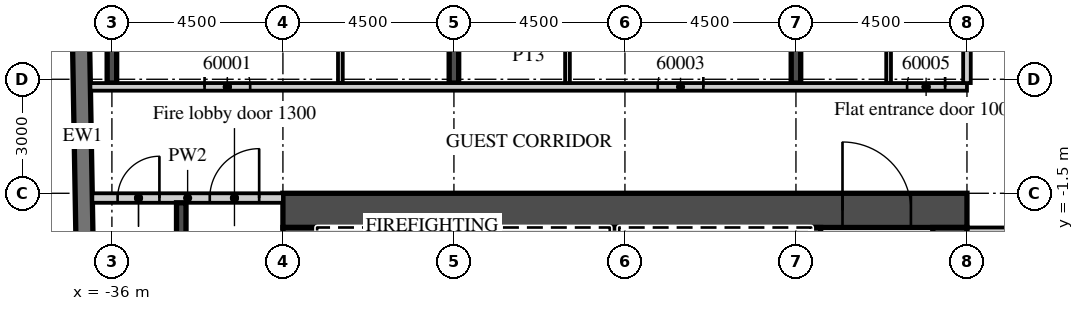
"""IFC4 building model, lengths in metres.
Left out: names, types, materials, properties, quantities, classifications, styles, units other than length and angle.
Written with IfcOpenShell. Run it as: python <this file> out.ifc"""

import sys

from ifc_helpers import new_model, si_unit, direction, frame, frame_2d, origin, place, context, subcontext, project, spatial, rectangle, extrude, element, fill, save


model = new_model("IFC4")
c1 = context("Model", 3, precision=1e-05, world=origin(), true_north=direction((0.0, 1.0)))
c2 = subcontext(c1, "Body", "Model", "MODEL_VIEW")
j1 = project(units=[si_unit("LENGTHUNIT", "METRE"), si_unit("PLANEANGLEUNIT", "RADIAN")], contexts=[c1])
p1 = place(None, origin())
s1 = spatial("IfcSite", under=j1, at=p1, CompositionType="ELEMENT")
p2 = place(p1, origin())
s2 = spatial("IfcBuilding", under=s1, at=p2, CompositionType="ELEMENT")
p3 = place(p2, frame((0.0, 0.0, 244.1)))
s3 = spatial("IfcBuildingStorey", under=s2, at=p3, CompositionType="ELEMENT", Elevation=244.1)
p4 = place(p3, frame((-36.0, 1.4, 0.0), z_axis=(0.0, 0.0, 1.0), x_axis=(0.0, 1.0, 0.0)))
e1 = element("IfcWall", 1, at=p4, inside=s3, PredefinedType="SHEAR", context=c2, shape_type="SweptSolid", body=[
    extrude(rectangle(XDim=17.125, YDim=0.25, at=frame_2d((8.563, 0.0))), origin(), (0.0, 0.0, 1.0), 3.3),
])
p5 = place(p3, frame((-27.0, 1.4, 0.0), z_axis=(0.0, 0.0, 1.0), x_axis=(0.0, 1.0, 0.0)))
e2 = element("IfcWall", 2, at=p5, inside=s3, PredefinedType="SHEAR", context=c2, shape_type="SweptSolid", body=[
    extrude(rectangle(XDim=18.817, YDim=0.25, at=frame_2d((9.409, 0.0))), origin(), (0.0, 0.0, 1.0), 3.3),
])
p6 = place(p3, frame((-18.0, 1.4, 0.0), z_axis=(0.0, 0.0, 1.0), x_axis=(0.0, 1.0, 0.0)))
e3 = element("IfcWall", 3, at=p6, inside=s3, PredefinedType="SHEAR", context=c2, shape_type="SweptSolid", body=[
    extrude(rectangle(XDim=18.974, YDim=0.25, at=frame_2d((9.487, 0.0))), origin(), (0.0, 0.0, 1.0), 3.3),
])
p7 = place(p3, frame((-37.057, 16.503, 0.0), z_axis=(0.0, 0.0, 1.0), x_axis=(0.017452279857, -0.999847697366, 0.0)))
e4 = element("IfcWall", 4, at=p7, inside=s3, PredefinedType="SOLIDWALL", context=c2, shape_type="SweptSolid", body=[
    extrude(rectangle(XDim=33.0, YDim=0.45, at=frame_2d((16.5, 0.0))), origin(), (0.0, 0.0, 1.0), 3.02),
])
p8 = place(p3, frame((-36.566, 1.3, 0.0), z_axis=(0.0, 0.0, 1.0), x_axis=(1.0, 0.0, 0.0)))
e5 = element("IfcWall", 5, at=p8, inside=s3, PredefinedType="PARTITIONING", context=c2, shape_type="SweptSolid", body=[
    extrude(rectangle(XDim=23.066, YDim=0.2, at=frame_2d((11.533, 0.0))), origin(), (0.0, 0.0, 1.0), 3.02),
])
p9 = place(p8, frame((3.004, 0.0, 0.0)))
e6 = element("IfcOpeningElement", 6, at=p9, cuts=e5, PredefinedType="OPENING", context=c2, shape_type="SweptSolid", body=[
    extrude(rectangle(XDim=1.2, YDim=2.1, at=frame_2d((0.6, 1.05))), frame((0.0, 0.11, 0.0), z_axis=(0.0, -1.0, 0.0), x_axis=(1.0, 0.0, 0.0)), (0.0, 0.0, 1.0), 0.22),
])
p10 = place(p8, frame((14.929, 0.0, 0.0)))
e7 = element("IfcOpeningElement", 7, at=p10, cuts=e5, PredefinedType="OPENING", context=c2, shape_type="SweptSolid", body=[
    extrude(rectangle(XDim=1.2, YDim=2.1, at=frame_2d((0.6, 1.05))), frame((0.0, 0.11, 0.0), z_axis=(0.0, -1.0, 0.0), x_axis=(1.0, 0.0, 0.0)), (0.0, 0.0, 1.0), 0.22),
])
p11 = place(p8, frame((21.491, 0.0, 0.0)))
e8 = element("IfcOpeningElement", 8, at=p11, cuts=e5, PredefinedType="OPENING", context=c2, shape_type="SweptSolid", body=[
    extrude(rectangle(XDim=1.0, YDim=2.1, at=frame_2d((0.5, 1.05))), frame((0.0, 0.11, 0.0), z_axis=(0.0, -1.0, 0.0), x_axis=(1.0, 0.0, 0.0)), (0.0, 0.0, 1.0), 0.22),
])
p12 = place(p3, frame((-29.988, 1.4, 0.0), z_axis=(0.0, 0.0, 1.0), x_axis=(0.0, 1.0, 0.0)))
e9 = element("IfcWall", 9, at=p12, inside=s3, PredefinedType="PARTITIONING", context=c2, shape_type="SweptSolid", body=[
    extrude(rectangle(XDim=7.725, YDim=0.125, at=frame_2d((3.863, 0.0))), origin(), (0.0, 0.0, 1.0), 3.02),
])
p13 = place(p12, frame((2.45, 0.0, 0.0)))
e10 = element("IfcOpeningElement", 10, at=p13, cuts=e9, PredefinedType="OPENING", context=c2, shape_type="SweptSolid", body=[
    extrude(rectangle(XDim=0.9, YDim=2.1, at=frame_2d((0.45, 1.05))), frame((0.0, 0.073, 0.0), z_axis=(0.0, -1.0, 0.0), x_axis=(1.0, 0.0, 0.0)), (0.0, 0.0, 1.0), 0.145),
])
p14 = place(p3, frame((-24.012, 1.4, 0.0), z_axis=(0.0, 0.0, 1.0), x_axis=(0.0, 1.0, 0.0)))
e11 = element("IfcWall", 11, at=p14, inside=s3, PredefinedType="PARTITIONING", context=c2, shape_type="SweptSolid", body=[
    extrude(rectangle(XDim=7.725, YDim=0.125, at=frame_2d((3.863, 0.0))), origin(), (0.0, 0.0, 1.0), 3.02),
])
p15 = place(p14, frame((2.45, 0.0, 0.0)))
e12 = element("IfcOpeningElement", 12, at=p15, cuts=e11, PredefinedType="OPENING", context=c2, shape_type="SweptSolid", body=[
    extrude(rectangle(XDim=0.9, YDim=2.1, at=frame_2d((0.45, 1.05))), frame((0.0, 0.073, 0.0), z_axis=(0.0, -1.0, 0.0), x_axis=(1.0, 0.0, 0.0)), (0.0, 0.0, 1.0), 0.145),
])
p16 = place(p3, frame((-13.5, 1.4, 0.0), z_axis=(0.0, 0.0, 1.0), x_axis=(0.0, 1.0, 0.0)))
e13 = element("IfcWall", 13, at=p16, inside=s3, PredefinedType="PARTITIONING", context=c2, shape_type="SweptSolid", body=[
    extrude(rectangle(XDim=19.065, YDim=0.2, at=frame_2d((9.533, 0.0))), origin(), (0.0, 0.0, 1.0), 3.02),
])
p17 = place(p3, frame((-15.562, 1.4, 0.0), z_axis=(0.0, 0.0, 1.0), x_axis=(0.0, 1.0, 0.0)))
e14 = element("IfcWall", 14, at=p17, inside=s3, PredefinedType="PARTITIONING", context=c2, shape_type="SweptSolid", body=[
    extrude(rectangle(XDim=7.725, YDim=0.125, at=frame_2d((3.863, 0.0))), origin(), (0.0, 0.0, 1.0), 3.02),
])
p18 = place(p17, frame((2.45, 0.0, 0.0)))
e15 = element("IfcOpeningElement", 15, at=p18, cuts=e14, PredefinedType="OPENING", context=c2, shape_type="SweptSolid", body=[
    extrude(rectangle(XDim=0.9, YDim=2.1, at=frame_2d((0.45, 1.05))), frame((0.0, 0.073, 0.0), z_axis=(0.0, -1.0, 0.0), x_axis=(1.0, 0.0, 0.0)), (0.0, 0.0, 1.0), 0.145),
])
p19 = place(p3, frame((-13.5, -2.5, 0.0), z_axis=(0.0, 0.0, 1.0), x_axis=(1.0, 0.0, 0.0)))
e16 = element("IfcWall", 16, at=p19, inside=s3, PredefinedType="PARTITIONING", context=c2, shape_type="SweptSolid", body=[
    extrude(rectangle(XDim=27.0, YDim=0.2, at=frame_2d((13.5, 0.0))), origin(), (0.0, 0.0, 1.0), 3.02),
])
p20 = place(p19, frame((2.925, 0.0, 0.0)))
e17 = element("IfcOpeningElement", 17, at=p20, cuts=e16, PredefinedType="OPENING", context=c2, shape_type="SweptSolid", body=[
    extrude(rectangle(XDim=1.0, YDim=2.1, at=frame_2d((0.5, 1.05))), frame((0.0, 0.11, 0.0), z_axis=(0.0, -1.0, 0.0), x_axis=(1.0, 0.0, 0.0)), (0.0, 0.0, 1.0), 0.22),
])
p21 = place(p19, frame((5.075, 0.0, 0.0)))
e18 = element("IfcOpeningElement", 18, at=p21, cuts=e16, PredefinedType="OPENING", context=c2, shape_type="SweptSolid", body=[
    extrude(rectangle(XDim=1.0, YDim=2.1, at=frame_2d((0.5, 1.05))), frame((0.0, 0.11, 0.0), z_axis=(0.0, -1.0, 0.0), x_axis=(1.0, 0.0, 0.0)), (0.0, 0.0, 1.0), 0.22),
])
p22 = place(p19, frame((9.55, 0.0, 0.0)))
e19 = element("IfcOpeningElement", 19, at=p22, cuts=e16, PredefinedType="OPENING", context=c2, shape_type="SweptSolid", body=[
    extrude(rectangle(XDim=1.0, YDim=2.1, at=frame_2d((0.5, 1.05))), frame((0.0, 0.11, 0.0), z_axis=(0.0, -1.0, 0.0), x_axis=(1.0, 0.0, 0.0)), (0.0, 0.0, 1.0), 0.22),
])
p23 = place(p19, frame((14.075, 0.0, 0.0)))
e20 = element("IfcOpeningElement", 20, at=p23, cuts=e16, PredefinedType="OPENING", context=c2, shape_type="SweptSolid", body=[
    extrude(rectangle(XDim=1.0, YDim=2.1, at=frame_2d((0.5, 1.05))), frame((0.0, 0.11, 0.0), z_axis=(0.0, -1.0, 0.0), x_axis=(1.0, 0.0, 0.0)), (0.0, 0.0, 1.0), 0.22),
])
p24 = place(p19, frame((20.925, 0.0, 0.0)))
e21 = element("IfcOpeningElement", 21, at=p24, cuts=e16, PredefinedType="OPENING", context=c2, shape_type="SweptSolid", body=[
    extrude(rectangle(XDim=1.0, YDim=2.1, at=frame_2d((0.5, 1.05))), frame((0.0, 0.11, 0.0), z_axis=(0.0, -1.0, 0.0), x_axis=(1.0, 0.0, 0.0)), (0.0, 0.0, 1.0), 0.22),
])
p25 = place(p19, frame((23.075, 0.0, 0.0)))
e22 = element("IfcOpeningElement", 22, at=p25, cuts=e16, PredefinedType="OPENING", context=c2, shape_type="SweptSolid", body=[
    extrude(rectangle(XDim=1.0, YDim=2.1, at=frame_2d((0.5, 1.05))), frame((0.0, 0.11, 0.0), z_axis=(0.0, -1.0, 0.0), x_axis=(1.0, 0.0, 0.0)), (0.0, 0.0, 1.0), 0.22),
])
p26 = place(p3, frame((-31.5, -1.95, 0.0), z_axis=(0.0, 0.0, 1.0), x_axis=(1.0, 0.0, 0.0)))
e23 = element("IfcWall", 23, at=p26, inside=s3, PredefinedType="SHEAR", context=c2, shape_type="SweptSolid", body=[
    extrude(rectangle(XDim=18.0, YDim=0.9, at=frame_2d((9.0, 0.0))), origin(), (0.0, 0.0, 1.0), 3.02),
])
p27 = place(p26, frame((14.725, 0.0, 0.0)))
e24 = element("IfcOpeningElement", 24, at=p27, cuts=e23, PredefinedType="OPENING", context=c2, shape_type="SweptSolid", body=[
    extrude(rectangle(XDim=1.8, YDim=2.1, at=frame_2d((0.9, 1.05))), frame((0.0, 0.46, 0.0), z_axis=(0.0, -1.0, 0.0), x_axis=(1.0, 0.0, 0.0)), (0.0, 0.0, 1.0), 0.92),
])
p28 = place(p3, frame((-31.05, -15.2, 0.0), z_axis=(0.0, 0.0, 1.0), x_axis=(0.0, 1.0, 0.0)))
e25 = element("IfcWall", 25, at=p28, inside=s3, PredefinedType="SHEAR", context=c2, shape_type="SweptSolid", body=[
    extrude(rectangle(XDim=12.8, YDim=0.9, at=frame_2d((6.4, 0.0))), origin(), (0.0, 0.0, 1.0), 3.02),
])
p29 = place(p28, frame((11.5, 0.0, 0.0)))
e26 = element("IfcOpeningElement", 26, at=p29, cuts=e25, PredefinedType="OPENING", context=c2, shape_type="SweptSolid", body=[
    extrude(rectangle(XDim=1.1, YDim=2.1, at=frame_2d((0.55, 1.05))), frame((0.0, 0.46, 0.0), z_axis=(0.0, -1.0, 0.0), x_axis=(1.0, 0.0, 0.0)), (0.0, 0.0, 1.0), 0.92),
])
p30 = place(p3, frame((-13.95, -14.6, 0.0), z_axis=(0.0, 0.0, 1.0), x_axis=(0.0, 1.0, 0.0)))
e27 = element("IfcWall", 27, at=p30, inside=s3, PredefinedType="SHEAR", context=c2, shape_type="SweptSolid", body=[
    extrude(rectangle(XDim=12.2, YDim=0.9, at=frame_2d((6.1, 0.0))), origin(), (0.0, 0.0, 1.0), 3.02),
])
p31 = place(p3, frame((-17.475, -5.55, 0.0), z_axis=(0.0, 0.0, 1.0), x_axis=(0.0, 1.0, 0.0)))
e28 = element("IfcWall", 28, at=p31, inside=s3, PredefinedType="SHEAR", context=c2, shape_type="SweptSolid", body=[
    extrude(rectangle(XDim=3.15, YDim=0.25, at=frame_2d((1.575, 0.0))), origin(), (0.0, 0.0, 1.0), 3.02),
])
for number, where, z_axis, x_axis in (
    (29, (-27.975, -5.3, 0.0), (0.0, 0.0, 1.0), (0.0, 1.0, 0.0)),
    (30, (-22.775, -5.3, 0.0), (0.0, 0.0, 1.0), (0.0, 1.0, 0.0)),
):
    element("IfcWall", number, at=place(p3, frame(where, z_axis=z_axis, x_axis=x_axis)), inside=s3, PredefinedType="SHEAR", context=c2, shape_type="SweptSolid", body=[
        extrude(rectangle(XDim=2.9, YDim=0.25, at=frame_2d((1.45, 0.0))), origin(), (0.0, 0.0, 1.0), 3.02),
    ])
p32 = place(p3, frame((-36.515, -1.625, 0.0), z_axis=(0.0, 0.0, 1.0), x_axis=(1.0, 0.0, 0.0)))
e31 = element("IfcWall", 31, at=p32, inside=s3, PredefinedType="PARTITIONING", context=c2, shape_type="SweptSolid", body=[
    extrude(rectangle(XDim=5.015, YDim=0.25, at=frame_2d((2.508, 0.0))), origin(), (0.0, 0.0, 1.0), 3.02),
])
p33 = place(p32, frame((3.09, 0.0, 0.0)))
e32 = element("IfcOpeningElement", 32, at=p33, cuts=e31, PredefinedType="OPENING", context=c2, shape_type="SweptSolid", body=[
    extrude(rectangle(XDim=1.3, YDim=2.1, at=frame_2d((0.65, 1.05))), frame((0.0, 0.135, 0.0), z_axis=(0.0, -1.0, 0.0), x_axis=(1.0, 0.0, 0.0)), (0.0, 0.0, 1.0), 0.27),
])
p34 = place(p32, frame((0.665, 0.0, 0.0)))
e33 = element("IfcOpeningElement", 33, at=p34, cuts=e31, PredefinedType="OPENING", context=c2, shape_type="SweptSolid", body=[
    extrude(rectangle(XDim=1.1, YDim=2.1, at=frame_2d((0.55, 1.05))), frame((0.0, 0.135, 0.0), z_axis=(0.0, -1.0, 0.0), x_axis=(1.0, 0.0, 0.0)), (0.0, 0.0, 1.0), 0.27),
])
p35 = place(p3, frame((-34.175, -10.1, 0.0), z_axis=(0.0, 0.0, 1.0), x_axis=(0.0, 1.0, 0.0)))
e34 = element("IfcWall", 34, at=p35, inside=s3, PredefinedType="SHEAR", context=c2, shape_type="SweptSolid", body=[
    extrude(rectangle(XDim=8.35, YDim=0.25, at=frame_2d((4.175, 0.0))), origin(), (0.0, 0.0, 1.0), 3.02),
])
p36 = place(p9, origin())
e35 = element("IfcDoor", 35, at=p36, inside=s3, OperationType="SINGLE_SWING_LEFT", PredefinedType="DOOR", context=c2, shape_type="SweptSolid", body=[
    extrude(rectangle(XDim=1.2, YDim=2.1, at=frame_2d((0.6, 1.05))), frame((0.0, 0.025, 0.0), z_axis=(0.0, -1.0, 0.0), x_axis=(1.0, 0.0, 0.0)), (0.0, 0.0, 1.0), 0.05),
])
fill(e6, e35)
p37 = place(p10, origin())
e36 = element("IfcDoor", 36, at=p37, inside=s3, OperationType="SINGLE_SWING_RIGHT", PredefinedType="DOOR", context=c2, shape_type="SweptSolid", body=[
    extrude(rectangle(XDim=1.2, YDim=2.1, at=frame_2d((0.6, 1.05))), frame((0.0, 0.025, 0.0), z_axis=(0.0, -1.0, 0.0), x_axis=(1.0, 0.0, 0.0)), (0.0, 0.0, 1.0), 0.05),
])
fill(e7, e36)
p38 = place(p11, origin())
e37 = element("IfcDoor", 37, at=p38, inside=s3, OperationType="SINGLE_SWING_RIGHT", PredefinedType="DOOR", context=c2, shape_type="SweptSolid", body=[
    extrude(rectangle(XDim=1.0, YDim=2.1, at=frame_2d((0.5, 1.05))), frame((0.0, 0.025, 0.0), z_axis=(0.0, -1.0, 0.0), x_axis=(1.0, 0.0, 0.0)), (0.0, 0.0, 1.0), 0.05),
])
fill(e8, e37)
p39 = place(p27, origin())
e38 = element("IfcDoor", 38, at=p39, inside=s3, OperationType="DOUBLE_DOOR_DOUBLE_SWING", PredefinedType="DOOR", context=c2, shape_type="SweptSolid", body=[
    extrude(rectangle(XDim=1.8, YDim=2.1, at=frame_2d((0.9, 1.05))), frame((0.0, 0.025, 0.0), z_axis=(0.0, -1.0, 0.0), x_axis=(1.0, 0.0, 0.0)), (0.0, 0.0, 1.0), 0.05),
])
fill(e24, e38)
p40 = place(p33, origin())
e39 = element("IfcDoor", 39, at=p40, inside=s3, OperationType="SINGLE_SWING_RIGHT", PredefinedType="DOOR", context=c2, shape_type="SweptSolid", body=[
    extrude(rectangle(XDim=1.3, YDim=2.1, at=frame_2d((0.65, 1.05))), frame((0.0, 0.025, 0.0), z_axis=(0.0, -1.0, 0.0), x_axis=(1.0, 0.0, 0.0)), (0.0, 0.0, 1.0), 0.05),
])
fill(e32, e39)
p41 = place(p34, origin())
e40 = element("IfcDoor", 40, at=p41, inside=s3, OperationType="SINGLE_SWING_RIGHT", PredefinedType="DOOR", context=c2, shape_type="SweptSolid", body=[
    extrude(rectangle(XDim=1.1, YDim=2.1, at=frame_2d((0.55, 1.05))), frame((0.0, 0.025, 0.0), z_axis=(0.0, -1.0, 0.0), x_axis=(1.0, 0.0, 0.0)), (0.0, 0.0, 1.0), 0.05),
])
fill(e33, e40)
save(model, sys.argv[1])
